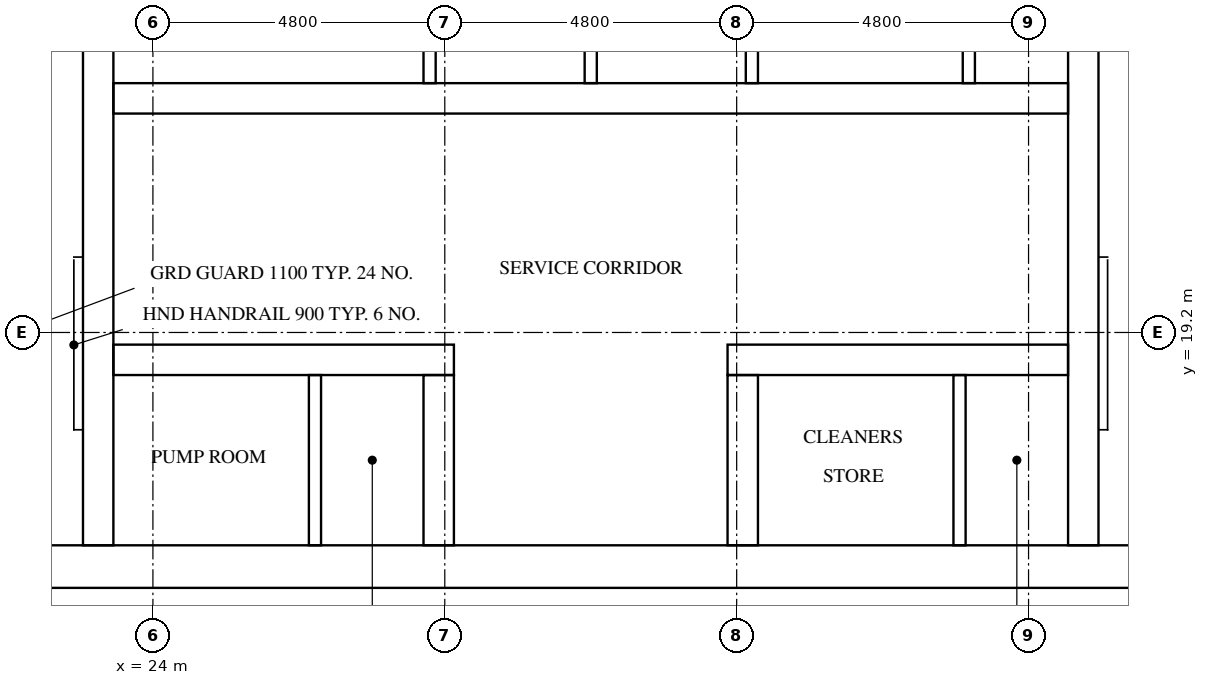
"""IFC4 building model, lengths in metres.
Left out: names, types, materials, properties, quantities, classifications, styles, units other than length and angle.
Written with IfcOpenShell. Run it as: python <this file> out.ifc"""

import sys

from ifc_helpers import new_model, si_unit, direction, frame, frame_2d, origin, place, context, subcontext, project, spatial, rectangle, extrude, element, fill, save


model = new_model("IFC4")
c1 = context("Model", 3, precision=1e-05, world=origin(), true_north=direction((0.0, 1.0)))
c2 = subcontext(c1, "Body", "Model", "MODEL_VIEW")
j1 = project(units=[si_unit("LENGTHUNIT", "METRE"), si_unit("PLANEANGLEUNIT", "RADIAN")], contexts=[c1])
p1 = place(None, origin())
s1 = spatial("IfcSite", under=j1, at=p1, CompositionType="ELEMENT")
p2 = place(p1, origin())
s2 = spatial("IfcBuilding", under=s1, at=p2, CompositionType="ELEMENT")
p3 = place(p2, frame((0.0, 0.0, 182.4)))
s3 = spatial("IfcBuildingStorey", under=s2, at=p3, CompositionType="ELEMENT", Elevation=182.4)
p4 = place(p3, frame((15.0, 15.35, 0.0), z_axis=(0.0, 0.0, 1.0), x_axis=(1.0, 0.0, 0.0)))
e1 = element("IfcWall", 1, at=p4, inside=s3, PredefinedType="SHEAR", context=c2, shape_type="SweptSolid", body=[
    extrude(rectangle(XDim=32.4, YDim=0.7, at=frame_2d((16.2, 0.0))), origin(), (0.0, 0.0, 1.0), 3.2),
])
p5 = place(p4, frame((15.3, 0.0, 0.0)))
e2 = element("IfcOpeningElement", 2, at=p5, cuts=e1, PredefinedType="OPENING", context=c2, shape_type="SweptSolid", body=[
    extrude(rectangle(XDim=1.8, YDim=2.1, at=frame_2d((0.9, 1.05))), frame((0.0, 0.36, 0.0), z_axis=(0.0, -1.0, 0.0), x_axis=(1.0, 0.0, 0.0)), (0.0, 0.0, 1.0), 0.72),
])
p6 = place(p3, frame((23.1, 15.7, 0.0), z_axis=(0.0, 0.0, 1.0), x_axis=(0.0, 1.0, 0.0)))
e3 = element("IfcWall", 3, at=p6, inside=s3, PredefinedType="SHEAR", context=c2, shape_type="SweptSolid", body=[
    extrude(rectangle(XDim=21.4, YDim=0.5, at=frame_2d((10.7, 0.0))), origin(), (0.0, 0.0, 1.0), 3.2),
])
p7 = place(p3, frame((39.3, 15.7, 0.0), z_axis=(0.0, 0.0, 1.0), x_axis=(0.0, 1.0, 0.0)))
e4 = element("IfcWall", 4, at=p7, inside=s3, PredefinedType="SHEAR", context=c2, shape_type="SweptSolid", body=[
    extrude(rectangle(XDim=8.55, YDim=0.5, at=frame_2d((4.275, 0.0))), origin(), (0.0, 0.0, 1.0), 3.2),
])
p8 = place(p3, frame((23.35, 18.75, 0.0), z_axis=(0.0, 0.0, 1.0), x_axis=(1.0, 0.0, 0.0)))
e5 = element("IfcWall", 5, at=p8, inside=s3, PredefinedType="SHEAR", context=c2, shape_type="SweptSolid", body=[
    extrude(rectangle(XDim=5.6, YDim=0.5, at=frame_2d((2.8, 0.0))), origin(), (0.0, 0.0, 1.0), 3.2),
])
p9 = place(p8, frame((1.107, 0.0, 0.0)))
e6 = element("IfcOpeningElement", 6, at=p9, cuts=e5, PredefinedType="OPENING", context=c2, shape_type="SweptSolid", body=[
    extrude(rectangle(XDim=1.0, YDim=2.1, at=frame_2d((0.5, 1.05))), frame((0.0, 0.26, 0.0), z_axis=(0.0, -1.0, 0.0), x_axis=(1.0, 0.0, 0.0)), (0.0, 0.0, 1.0), 0.52),
])
p10 = place(p8, frame((3.758, 0.0, 0.0)))
e7 = element("IfcOpeningElement", 7, at=p10, cuts=e5, PredefinedType="OPENING", context=c2, shape_type="SweptSolid", body=[
    extrude(rectangle(XDim=1.0, YDim=2.1, at=frame_2d((0.5, 1.05))), frame((0.0, 0.26, 0.0), z_axis=(0.0, -1.0, 0.0), x_axis=(1.0, 0.0, 0.0)), (0.0, 0.0, 1.0), 0.52),
])
p11 = place(p3, frame((33.45, 18.75, 0.0), z_axis=(0.0, 0.0, 1.0), x_axis=(1.0, 0.0, 0.0)))
e8 = element("IfcWall", 8, at=p11, inside=s3, PredefinedType="SHEAR", context=c2, shape_type="SweptSolid", body=[
    extrude(rectangle(XDim=5.6, YDim=0.5, at=frame_2d((2.8, 0.0))), origin(), (0.0, 0.0, 1.0), 3.2),
])
p12 = place(p11, frame((1.607, 0.0, 0.0)))
e9 = element("IfcOpeningElement", 9, at=p12, cuts=e8, PredefinedType="OPENING", context=c2, shape_type="SweptSolid", body=[
    extrude(rectangle(XDim=1.0, YDim=2.1, at=frame_2d((0.5, 1.05))), frame((0.0, 0.26, 0.0), z_axis=(0.0, -1.0, 0.0), x_axis=(1.0, 0.0, 0.0)), (0.0, 0.0, 1.0), 0.52),
])
p13 = place(p11, frame((4.258, 0.0, 0.0)))
e10 = element("IfcOpeningElement", 10, at=p13, cuts=e8, PredefinedType="OPENING", context=c2, shape_type="SweptSolid", body=[
    extrude(rectangle(XDim=1.0, YDim=2.1, at=frame_2d((0.5, 1.05))), frame((0.0, 0.26, 0.0), z_axis=(0.0, -1.0, 0.0), x_axis=(1.0, 0.0, 0.0)), (0.0, 0.0, 1.0), 0.52),
])
p14 = place(p3, frame((23.35, 23.05, 0.0), z_axis=(0.0, 0.0, 1.0), x_axis=(1.0, 0.0, 0.0)))
e11 = element("IfcWall", 11, at=p14, inside=s3, PredefinedType="SHEAR", context=c2, shape_type="SweptSolid", body=[
    extrude(rectangle(XDim=15.7, YDim=0.5, at=frame_2d((7.85, 0.0))), origin(), (0.0, 0.0, 1.0), 3.2),
])
p15 = place(p14, frame((2.05, 0.0, 0.0)))
e12 = element("IfcOpeningElement", 12, at=p15, cuts=e11, PredefinedType="OPENING", context=c2, shape_type="SweptSolid", body=[
    extrude(rectangle(XDim=1.0, YDim=2.1, at=frame_2d((0.5, 1.05))), frame((0.0, 0.26, 0.0), z_axis=(0.0, -1.0, 0.0), x_axis=(1.0, 0.0, 0.0)), (0.0, 0.0, 1.0), 0.52),
])
p16 = place(p14, frame((11.784, 0.0, 0.0)))
e13 = element("IfcOpeningElement", 13, at=p16, cuts=e11, PredefinedType="OPENING", context=c2, shape_type="SweptSolid", body=[
    extrude(rectangle(XDim=1.0, YDim=2.1, at=frame_2d((0.5, 1.05))), frame((0.0, 0.26, 0.0), z_axis=(0.0, -1.0, 0.0), x_axis=(1.0, 0.0, 0.0)), (0.0, 0.0, 1.0), 0.52),
])
p17 = place(p14, frame((14.434, 0.0, 0.0)))
e14 = element("IfcOpeningElement", 14, at=p17, cuts=e11, PredefinedType="OPENING", context=c2, shape_type="SweptSolid", body=[
    extrude(rectangle(XDim=1.0, YDim=2.1, at=frame_2d((0.5, 1.05))), frame((0.0, 0.26, 0.0), z_axis=(0.0, -1.0, 0.0), x_axis=(1.0, 0.0, 0.0)), (0.0, 0.0, 1.0), 0.52),
])
for number, where, z_axis, x_axis in (
    (15, (28.7, 15.7, 0.0), (0.0, 0.0, 1.0), (0.0, 1.0, 0.0)),
    (16, (33.7, 15.7, 0.0), (0.0, 0.0, 1.0), (0.0, 1.0, 0.0)),
):
    element("IfcWall", number, at=place(p3, frame(where, z_axis=z_axis, x_axis=x_axis)), inside=s3, PredefinedType="SHEAR", context=c2, shape_type="SweptSolid", body=[
        extrude(rectangle(XDim=2.8, YDim=0.5, at=frame_2d((1.4, 0.0))), origin(), (0.0, 0.0, 1.0), 3.2),
    ])
for number, where, z_axis, x_axis in (
    (17, (28.55, 23.3, 0.0), (0.0, 0.0, 1.0), (0.0, 1.0, 0.0)),
    (18, (31.2, 23.3, 0.0), (0.0, 0.0, 1.0), (0.0, 1.0, 0.0)),
    (19, (33.85, 23.3, 0.0), (0.0, 0.0, 1.0), (0.0, 1.0, 0.0)),
):
    element("IfcWall", number, at=place(p3, frame(where, z_axis=z_axis, x_axis=x_axis)), inside=s3, PredefinedType="SOLIDWALL", context=c2, shape_type="SweptSolid", body=[
        extrude(rectangle(XDim=2.6, YDim=0.2, at=frame_2d((1.3, 0.0))), origin(), (0.0, 0.0, 1.0), 3.2),
    ])
p18 = place(p3, frame((37.418, 23.3, 0.0), z_axis=(0.0, 0.0, 1.0), x_axis=(0.0, 1.0, 0.0)))
e20 = element("IfcWall", 20, at=p18, inside=s3, PredefinedType="PARTITIONING", context=c2, shape_type="SweptSolid", body=[
    extrude(rectangle(XDim=2.6, YDim=0.2, at=frame_2d((1.3, 0.0))), origin(), (0.0, 0.0, 1.0), 3.2),
])
for number, where, z_axis, x_axis in (
    (21, (26.665, 15.7, 0.0), (0.0, 0.0, 1.0), (0.0, 1.0, 0.0)),
    (22, (37.265, 15.7, 0.0), (0.0, 0.0, 1.0), (0.0, 1.0, 0.0)),
):
    element("IfcWall", number, at=place(p3, frame(where, z_axis=z_axis, x_axis=x_axis)), inside=s3, PredefinedType="PARTITIONING", context=c2, shape_type="SweptSolid", body=[
        extrude(rectangle(XDim=2.8, YDim=0.2, at=frame_2d((1.4, 0.0))), origin(), (0.0, 0.0, 1.0), 3.2),
    ])
p19 = place(p5, frame((1.8, 0.0, 0.0), z_axis=(0.0, 0.0, 1.0), x_axis=(-1.0, 0.0, 0.0)))
e23 = element("IfcDoor", 23, at=p19, inside=s3, OperationType="DOUBLE_DOOR_SINGLE_SWING", PredefinedType="DOOR", context=c2, shape_type="SweptSolid", body=[
    extrude(rectangle(XDim=1.8, YDim=2.1, at=frame_2d((0.9, 1.05))), frame((0.0, 0.025, 0.0), z_axis=(0.0, -1.0, 0.0), x_axis=(1.0, 0.0, 0.0)), (0.0, 0.0, 1.0), 0.05),
])
fill(e2, e23)
p20 = place(p15, frame((1.0, 0.0, 0.0), z_axis=(0.0, 0.0, 1.0), x_axis=(-1.0, 0.0, 0.0)))
e24 = element("IfcDoor", 24, at=p20, inside=s3, OperationType="SINGLE_SWING_RIGHT", PredefinedType="DOOR", context=c2, shape_type="SweptSolid", body=[
    extrude(rectangle(XDim=1.0, YDim=2.1, at=frame_2d((0.5, 1.05))), frame((0.0, 0.025, 0.0), z_axis=(0.0, -1.0, 0.0), x_axis=(1.0, 0.0, 0.0)), (0.0, 0.0, 1.0), 0.05),
])
fill(e12, e24)
p21 = place(p16, frame((1.0, 0.0, 0.0), z_axis=(0.0, 0.0, 1.0), x_axis=(-1.0, 0.0, 0.0)))
e25 = element("IfcDoor", 25, at=p21, inside=s3, OperationType="SINGLE_SWING_LEFT", PredefinedType="DOOR", context=c2, shape_type="SweptSolid", body=[
    extrude(rectangle(XDim=1.0, YDim=2.1, at=frame_2d((0.5, 1.05))), frame((0.0, 0.025, 0.0), z_axis=(0.0, -1.0, 0.0), x_axis=(1.0, 0.0, 0.0)), (0.0, 0.0, 1.0), 0.05),
])
fill(e13, e25)
p22 = place(p17, frame((1.0, 0.0, 0.0), z_axis=(0.0, 0.0, 1.0), x_axis=(-1.0, 0.0, 0.0)))
e26 = element("IfcDoor", 26, at=p22, inside=s3, OperationType="SINGLE_SWING_RIGHT", PredefinedType="DOOR", context=c2, shape_type="SweptSolid", body=[
    extrude(rectangle(XDim=1.0, YDim=2.1, at=frame_2d((0.5, 1.05))), frame((0.0, 0.025, 0.0), z_axis=(0.0, -1.0, 0.0), x_axis=(1.0, 0.0, 0.0)), (0.0, 0.0, 1.0), 0.05),
])
fill(e14, e26)
p23 = place(p9, origin())
e27 = element("IfcDoor", 27, at=p23, inside=s3, OperationType="SINGLE_SWING_LEFT", PredefinedType="DOOR", context=c2, shape_type="SweptSolid", body=[
    extrude(rectangle(XDim=1.0, YDim=2.1, at=frame_2d((0.5, 1.05))), frame((0.0, 0.025, 0.0), z_axis=(0.0, -1.0, 0.0), x_axis=(1.0, 0.0, 0.0)), (0.0, 0.0, 1.0), 0.05),
])
fill(e6, e27)
p24 = place(p10, origin())
e28 = element("IfcDoor", 28, at=p24, inside=s3, OperationType="SINGLE_SWING_RIGHT", PredefinedType="DOOR", context=c2, shape_type="SweptSolid", body=[
    extrude(rectangle(XDim=1.0, YDim=2.1, at=frame_2d((0.5, 1.05))), frame((0.0, 0.025, 0.0), z_axis=(0.0, -1.0, 0.0), x_axis=(1.0, 0.0, 0.0)), (0.0, 0.0, 1.0), 0.05),
])
fill(e7, e28)
p25 = place(p12, origin())
e29 = element("IfcDoor", 29, at=p25, inside=s3, OperationType="SINGLE_SWING_LEFT", PredefinedType="DOOR", context=c2, shape_type="SweptSolid", body=[
    extrude(rectangle(XDim=1.0, YDim=2.1, at=frame_2d((0.5, 1.05))), frame((0.0, 0.025, 0.0), z_axis=(0.0, -1.0, 0.0), x_axis=(1.0, 0.0, 0.0)), (0.0, 0.0, 1.0), 0.05),
])
fill(e9, e29)
p26 = place(p13, origin())
e30 = element("IfcDoor", 30, at=p26, inside=s3, OperationType="SINGLE_SWING_RIGHT", PredefinedType="DOOR", context=c2, shape_type="SweptSolid", body=[
    extrude(rectangle(XDim=1.0, YDim=2.1, at=frame_2d((0.5, 1.05))), frame((0.0, 0.025, 0.0), z_axis=(0.0, -1.0, 0.0), x_axis=(1.0, 0.0, 0.0)), (0.0, 0.0, 1.0), 0.05),
])
fill(e10, e30)
save(model, sys.argv[1])
